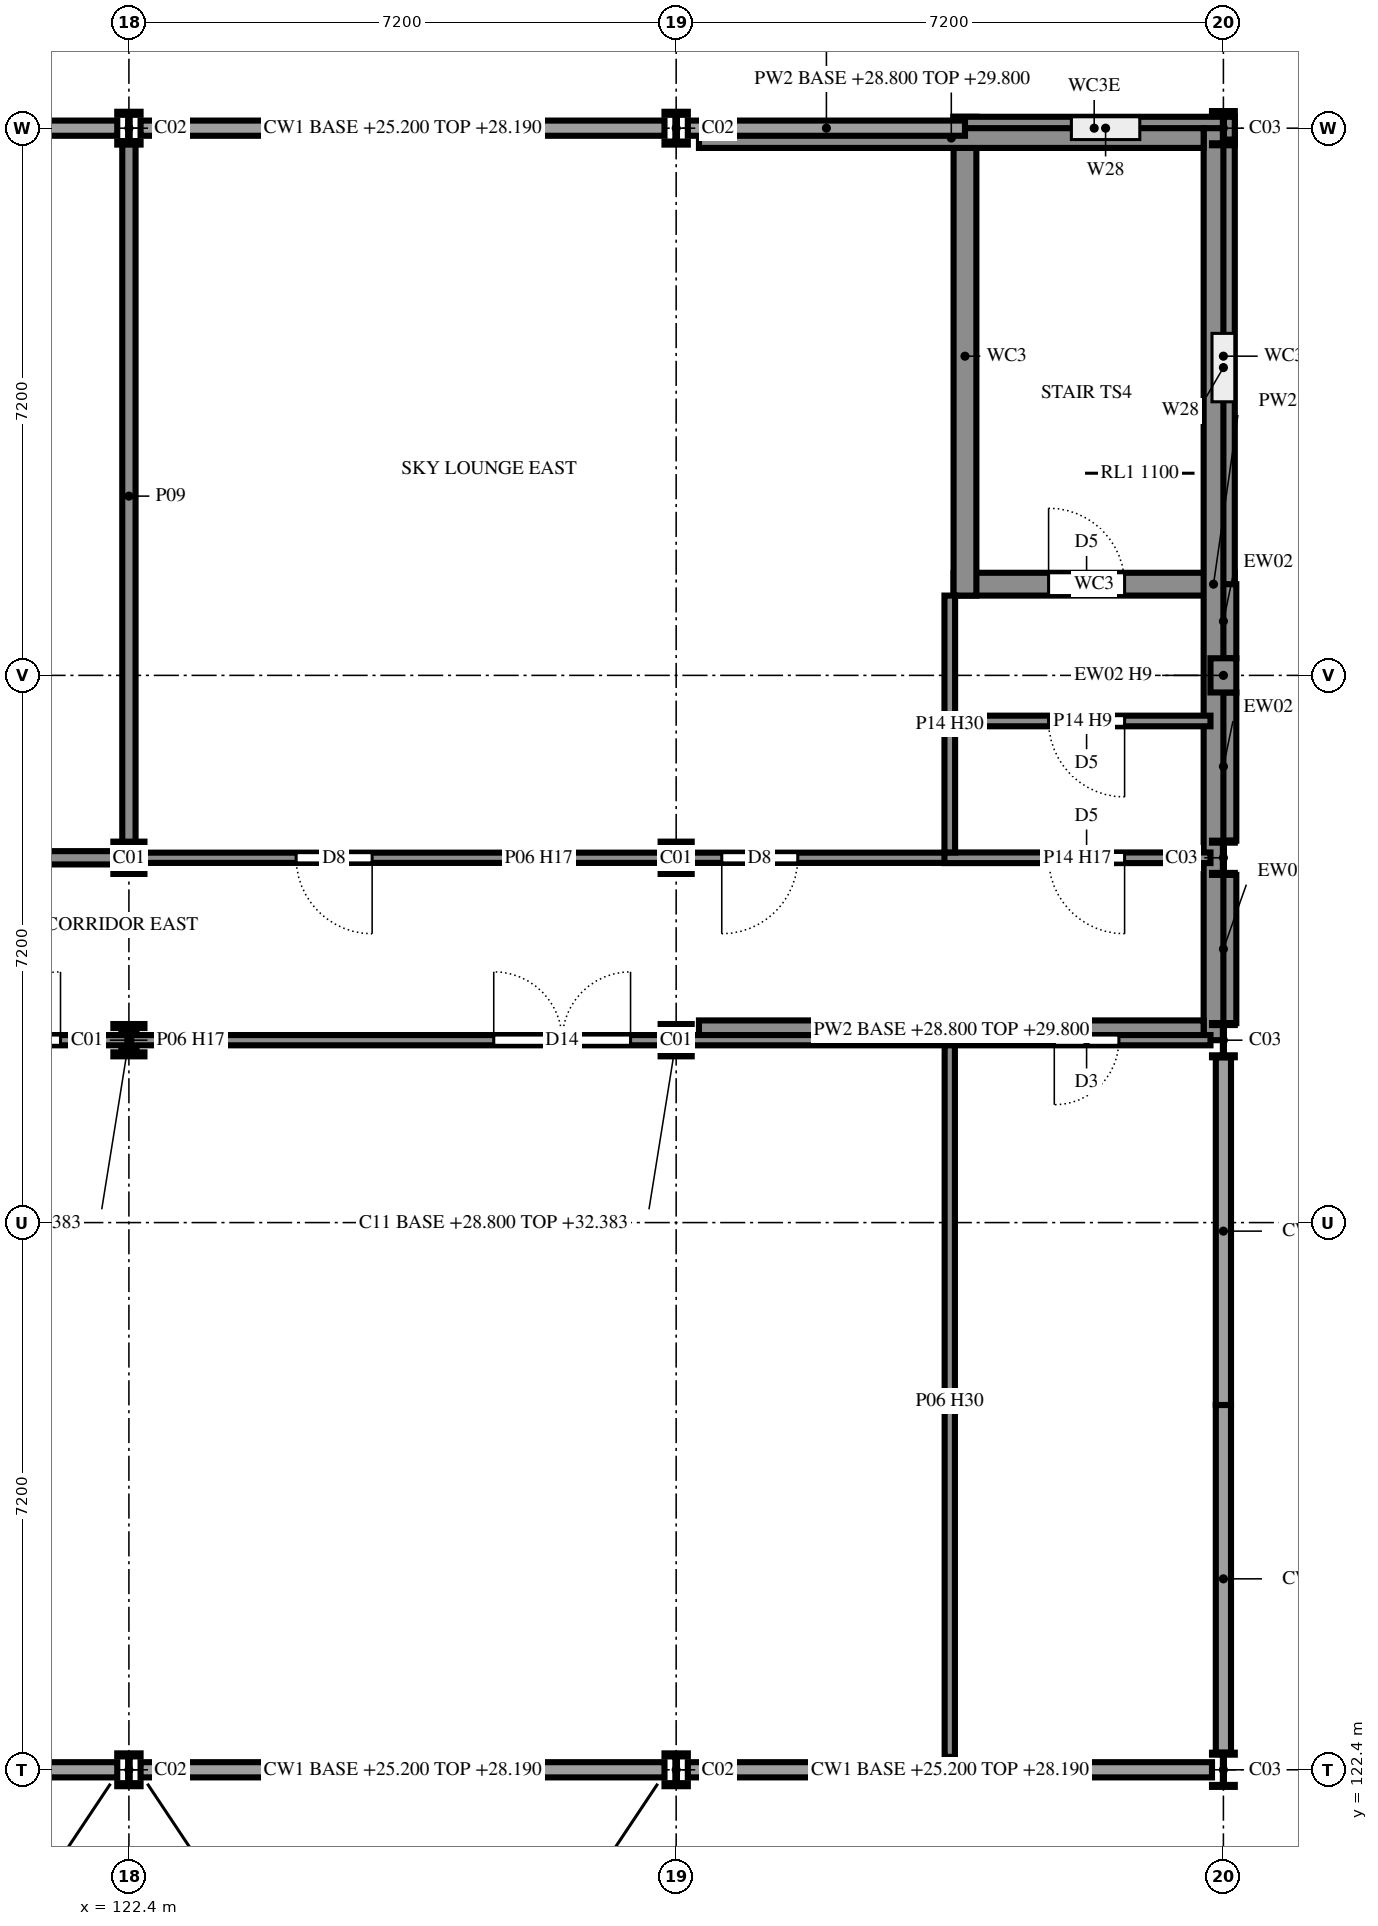
"""IFC4 building model, lengths in metres.
Left out: names, types, materials, properties, quantities, classifications, styles, units other than length and angle.
Written with IfcOpenShell. Run it as: python <this file> out.ifc"""

import sys

from ifc_helpers import new_model, si_unit, direction, frame, frame_2d, origin, origin_2d, place, context, subcontext, project, spatial, rectangle, i_section, extrude, element, fill, save


model = new_model("IFC4")
c1 = context("Model", 3, precision=1e-05, world=origin(), true_north=direction((0.0, 1.0)))
c2 = subcontext(c1, "Body", "Model", "MODEL_VIEW")
j1 = project(units=[si_unit("LENGTHUNIT", "METRE"), si_unit("PLANEANGLEUNIT", "RADIAN")], contexts=[c1])
p1 = place(None, origin())
s1 = spatial("IfcSite", under=j1, at=p1, CompositionType="ELEMENT")
p2 = place(p1, origin())
s2 = spatial("IfcBuilding", under=s1, at=p2, CompositionType="ELEMENT")
p3 = place(p2, frame((0.0, 0.0, 25.2)))
s3 = spatial("IfcBuildingStorey", under=s2, at=p3, CompositionType="ELEMENT", Elevation=25.2)
p4 = place(p3, frame((122.4, 122.4, 0.0), z_axis=(0.0, 0.0, 1.0), x_axis=(1.0, 0.0, 0.0)))
e1 = element("IfcColumn", 1, at=p4, inside=s3, PredefinedType="COLUMN", context=c2, shape_type="SweptSolid", body=[
    extrude(i_section(OverallWidth=0.307, OverallDepth=0.432, WebThickness=0.021, FlangeThickness=0.04, FilletRadius=0.027, at=origin_2d()), origin(), (0.0, 0.0, 1.0), 3.6),
])
for number, where, z_axis, x_axis in (
    (2, (122.4, 132.0, 0.0), (0.0, 0.0, 1.0), (1.0, 0.0, 0.0)),
    (3, (122.4, 134.4, 0.0), (0.0, 0.0, 1.0), (1.0, 0.0, 0.0)),
):
    element("IfcColumn", number, at=place(p3, frame(where, z_axis=z_axis, x_axis=x_axis)), inside=s3, PredefinedType="COLUMN", context=c2, shape_type="SweptSolid", body=[
        extrude(i_section(OverallWidth=0.409, OverallDepth=0.425, WebThickness=0.033, FlangeThickness=0.052, FilletRadius=0.015, at=origin_2d()), origin(), (0.0, 0.0, 1.0), 3.6),
    ])
for number, where, z_axis, x_axis in (
    (4, (122.4, 144.0, 0.0), (0.0, 0.0, 1.0), (1.0, 0.0, 0.0)),
    (5, (129.6, 122.4, 0.0), (0.0, 0.0, 1.0), (1.0, 0.0, 0.0)),
):
    element("IfcColumn", number, at=place(p3, frame(where, z_axis=z_axis, x_axis=x_axis)), inside=s3, PredefinedType="COLUMN", context=c2, shape_type="SweptSolid", body=[
        extrude(i_section(OverallWidth=0.307, OverallDepth=0.432, WebThickness=0.021, FlangeThickness=0.04, FilletRadius=0.027, at=origin_2d()), origin(), (0.0, 0.0, 1.0), 3.6),
    ])
for number, where, z_axis, x_axis in (
    (6, (129.6, 132.0, 0.0), (0.0, 0.0, 1.0), (1.0, 0.0, 0.0)),
    (7, (129.6, 134.4, 0.0), (0.0, 0.0, 1.0), (1.0, 0.0, 0.0)),
):
    element("IfcColumn", number, at=place(p3, frame(where, z_axis=z_axis, x_axis=x_axis)), inside=s3, PredefinedType="COLUMN", context=c2, shape_type="SweptSolid", body=[
        extrude(i_section(OverallWidth=0.409, OverallDepth=0.425, WebThickness=0.033, FlangeThickness=0.052, FilletRadius=0.015, at=origin_2d()), origin(), (0.0, 0.0, 1.0), 3.6),
    ])
p5 = place(p3, frame((129.6, 144.0, 0.0), z_axis=(0.0, 0.0, 1.0), x_axis=(1.0, 0.0, 0.0)))
e8 = element("IfcColumn", 8, at=p5, inside=s3, PredefinedType="COLUMN", context=c2, shape_type="SweptSolid", body=[
    extrude(i_section(OverallWidth=0.307, OverallDepth=0.432, WebThickness=0.021, FlangeThickness=0.04, FilletRadius=0.027, at=origin_2d()), origin(), (0.0, 0.0, 1.0), 3.6),
])
for number, where, z_axis, x_axis in (
    (9, (136.8, 122.4, 0.0), (0.0, 0.0, 1.0), (1.0, 0.0, 0.0)),
    (10, (136.8, 132.0, 0.0), (0.0, 0.0, 1.0), (1.0, 0.0, 0.0)),
    (11, (136.8, 134.4, 0.0), (0.0, 0.0, 1.0), (1.0, 0.0, 0.0)),
    (12, (136.8, 144.0, 0.0), (0.0, 0.0, 1.0), (1.0, 0.0, 0.0)),
):
    element("IfcColumn", number, at=place(p3, frame(where, z_axis=z_axis, x_axis=x_axis)), inside=s3, PredefinedType="COLUMN", context=c2, shape_type="SweptSolid", body=[
        extrude(i_section(OverallWidth=0.3, OverallDepth=0.45, WebThickness=0.014, FlangeThickness=0.026, FilletRadius=0.027, at=origin_2d()), origin(), (0.0, 0.0, 1.0), 3.6),
    ])
p6 = place(p3, frame((133.25, 138.0, 0.0), z_axis=(0.0, 0.0, 1.0), x_axis=(1.0, 0.0, 0.0)))
e13 = element("IfcWall", 13, at=p6, inside=s3, PredefinedType="SHEAR", context=c2, shape_type="SweptSolid", body=[
    extrude(rectangle(XDim=3.7, YDim=0.3, at=frame_2d((1.85, 0.0))), origin(), (0.0, 0.0, 1.0), 3.6),
])
p7 = place(p6, frame((1.25, 0.0, 0.0)))
e14 = element("IfcOpeningElement", 14, at=p7, cuts=e13, PredefinedType="OPENING", context=c2, shape_type="SweptSolid", body=[
    extrude(rectangle(XDim=1.0, YDim=2.1, at=frame_2d((0.5, 1.05))), frame((0.0, 0.16, 0.0), z_axis=(0.0, -1.0, 0.0), x_axis=(1.0, 0.0, 0.0)), (0.0, 0.0, 1.0), 0.32),
])
p8 = place(p3, frame((136.8, 137.85, 0.0), z_axis=(0.0, 0.0, 1.0), x_axis=(0.0, 1.0, 0.0)))
e15 = element("IfcWall", 15, at=p8, inside=s3, PredefinedType="SHEAR", context=c2, shape_type="SweptSolid", body=[
    extrude(rectangle(XDim=6.3, YDim=0.3, at=frame_2d((3.15, 0.0))), origin(), (0.0, 0.0, 1.0), 3.6),
])
p9 = place(p8, frame((2.55, 0.0, 0.6)))
e16 = element("IfcOpeningElement", 16, at=p9, cuts=e15, PredefinedType="OPENING", context=c2, shape_type="SweptSolid", body=[
    extrude(rectangle(XDim=0.9, YDim=2.1, at=frame_2d((0.45, 1.05))), frame((0.0, 0.16, 0.0), z_axis=(0.0, -1.0, 0.0), x_axis=(1.0, 0.0, 0.0)), (0.0, 0.0, 1.0), 0.32),
])
p10 = place(p3, frame((133.4, 144.15, 0.0), z_axis=(0.0, 0.0, 1.0), x_axis=(0.0, -1.0, 0.0)))
e17 = element("IfcWall", 17, at=p10, inside=s3, PredefinedType="SHEAR", context=c2, shape_type="SweptSolid", body=[
    extrude(rectangle(XDim=6.3, YDim=0.3, at=frame_2d((3.15, 0.0))), origin(), (0.0, 0.0, 1.0), 3.6),
])
p11 = place(p3, frame((136.95, 144.0, 0.0), z_axis=(0.0, 0.0, 1.0), x_axis=(-1.0, 0.0, 0.0)))
e18 = element("IfcWall", 18, at=p11, inside=s3, PredefinedType="SHEAR", context=c2, shape_type="SweptSolid", body=[
    extrude(rectangle(XDim=3.7, YDim=0.3, at=frame_2d((1.85, 0.0))), origin(), (0.0, 0.0, 1.0), 3.6),
])
p12 = place(p11, frame((1.25, 0.0, 0.6)))
e19 = element("IfcOpeningElement", 19, at=p12, cuts=e18, PredefinedType="OPENING", context=c2, shape_type="SweptSolid", body=[
    extrude(rectangle(XDim=0.9, YDim=2.1, at=frame_2d((0.45, 1.05))), frame((0.0, 0.16, 0.0), z_axis=(0.0, -1.0, 0.0), x_axis=(1.0, 0.0, 0.0)), (0.0, 0.0, 1.0), 0.32),
])
p13 = place(p3, frame((136.8, 132.225, 0.0), z_axis=(0.0, 0.0, 1.0), x_axis=(0.0, 1.0, 0.0)))
e20 = element("IfcWall", 20, at=p13, inside=s3, PredefinedType="SOLIDWALL", context=c2, shape_type="SweptSolid", body=[
    extrude(rectangle(XDim=1.95, YDim=0.34, at=frame_2d((0.975, 0.0))), origin(), (0.0, 0.0, 1.0), 3.09),
])
p14 = place(p3, frame((136.8, 134.625, 0.0), z_axis=(0.0, 0.0, 1.0), x_axis=(0.0, 1.0, 0.0)))
e21 = element("IfcWall", 21, at=p14, inside=s3, PredefinedType="SOLIDWALL", context=c2, shape_type="SweptSolid", body=[
    extrude(rectangle(XDim=1.95, YDim=0.34, at=frame_2d((0.975, 0.0))), origin(), (0.0, 0.0, 1.0), 3.29),
])
p15 = place(p3, frame((136.8, 137.025, 0.0), z_axis=(0.0, 0.0, 1.0), x_axis=(0.0, 1.0, 0.0)))
e22 = element("IfcWall", 22, at=p15, inside=s3, PredefinedType="SOLIDWALL", context=c2, shape_type="SweptSolid", body=[
    extrude(rectangle(XDim=0.975, YDim=0.34, at=frame_2d((0.488, 0.0))), origin(), (0.0, 0.0, 1.0), 3.29),
])
p16 = place(p3, frame((136.67, 132.0, 3.6), z_axis=(0.0, 0.0, 1.0), x_axis=(0.0, 1.0, 0.0)))
e23 = element("IfcWall", 23, at=p16, inside=s3, PredefinedType="PARAPET", context=c2, shape_type="SweptSolid", body=[
    extrude(rectangle(XDim=12.0, YDim=0.26, at=frame_2d((6.0, 0.0))), origin(), (0.0, 0.0, 1.0), 1.0),
])
for number, where, z_axis, x_axis in (
    (24, (129.9, 132.13, 3.6), (0.0, 0.0, 1.0), (1.0, 0.0, 0.0)),
    (25, (129.9, 143.87, 3.6), (0.0, 0.0, 1.0), (1.0, 0.0, 0.0)),
):
    element("IfcWall", number, at=place(p3, frame(where, z_axis=z_axis, x_axis=x_axis)), inside=s3, PredefinedType="PARAPET", context=c2, shape_type="SweptSolid", body=[
        extrude(rectangle(XDim=6.64, YDim=0.26, at=frame_2d((3.32, 0.0))), origin(), (0.0, 0.0, 1.0), 1.0),
    ])
for number, where, z_axis, x_axis in (
    (26, (122.4, 132.0, 3.6), (0.0, 0.0, 1.0), (1.0, 0.0, 0.0)),
    (27, (129.6, 132.0, 3.6), (0.0, 0.0, 1.0), (1.0, 0.0, 0.0)),
):
    element("IfcColumn", number, at=place(p3, frame(where, z_axis=z_axis, x_axis=x_axis)), inside=s3, PredefinedType="COLUMN", context=c2, shape_type="SweptSolid", body=[
        extrude(i_section(OverallWidth=0.2, OverallDepth=0.2, WebThickness=0.009, FlangeThickness=0.015, FilletRadius=0.018, at=origin_2d()), origin(), (0.0, 0.0, 1.0), 3.583),
    ])
p17 = place(p3, frame((136.8, 136.575, 0.0), z_axis=(0.0, 0.0, 1.0), x_axis=(0.0, 1.0, 0.0)))
e28 = element("IfcWall", 28, at=p17, inside=s3, PredefinedType="SOLIDWALL", context=c2, shape_type="SweptSolid", body=[
    extrude(rectangle(XDim=0.45, YDim=0.34, at=frame_2d((0.225, 0.0))), origin(), (0.0, 0.0, 1.0), 3.29),
])
p18 = place(p3, frame((108.2, 132.0, 0.0), z_axis=(0.0, 0.0, 1.0), x_axis=(1.0, 0.0, 0.0)))
e29 = element("IfcWall", 29, at=p18, inside=s3, PredefinedType="PARTITIONING", context=c2, shape_type="SweptSolid", body=[
    extrude(rectangle(XDim=28.43, YDim=0.135, at=frame_2d((14.215, 0.0))), origin(), (0.0, 0.0, 1.0), 2.99),
])
p19 = place(p18, frame((26.375, 0.0, 0.0)))
e30 = element("IfcOpeningElement", 30, at=p19, cuts=e29, PredefinedType="OPENING", context=c2, shape_type="SweptSolid", body=[
    extrude(rectangle(XDim=0.85, YDim=2.1, at=frame_2d((0.425, 1.05))), frame((0.0, 0.077, 0.0), z_axis=(0.0, -1.0, 0.0), x_axis=(1.0, 0.0, 0.0)), (0.0, 0.0, 1.0), 0.155),
])
p20 = place(p18, frame((3.1, 0.0, 0.0)))
e31 = element("IfcOpeningElement", 31, at=p20, cuts=e29, PredefinedType="OPENING", context=c2, shape_type="SweptSolid", body=[
    extrude(rectangle(XDim=1.8, YDim=2.1, at=frame_2d((0.9, 1.05))), frame((0.0, 0.077, 0.0), z_axis=(0.0, -1.0, 0.0), x_axis=(1.0, 0.0, 0.0)), (0.0, 0.0, 1.0), 0.155),
])
p21 = place(p18, frame((11.5, 0.0, 0.0)))
e32 = element("IfcOpeningElement", 32, at=p21, cuts=e29, PredefinedType="OPENING", context=c2, shape_type="SweptSolid", body=[
    extrude(rectangle(XDim=1.8, YDim=2.1, at=frame_2d((0.9, 1.05))), frame((0.0, 0.077, 0.0), z_axis=(0.0, -1.0, 0.0), x_axis=(1.0, 0.0, 0.0)), (0.0, 0.0, 1.0), 0.155),
])
p22 = place(p18, frame((19.0, 0.0, 0.0)))
e33 = element("IfcOpeningElement", 33, at=p22, cuts=e29, PredefinedType="OPENING", context=c2, shape_type="SweptSolid", body=[
    extrude(rectangle(XDim=1.8, YDim=2.1, at=frame_2d((0.9, 1.05))), frame((0.0, 0.077, 0.0), z_axis=(0.0, -1.0, 0.0), x_axis=(1.0, 0.0, 0.0)), (0.0, 0.0, 1.0), 0.155),
])
p23 = place(p3, frame((108.2, 134.4, 0.0), z_axis=(0.0, 0.0, 1.0), x_axis=(1.0, 0.0, 0.0)))
e34 = element("IfcWall", 34, at=p23, inside=s3, PredefinedType="PARTITIONING", context=c2, shape_type="SweptSolid", body=[
    extrude(rectangle(XDim=14.288, YDim=0.175, at=frame_2d((7.144, 0.0))), origin(), (0.0, 0.0, 1.0), 2.99),
])
p24 = place(p23, frame((7.6, 0.0, 0.0)))
e35 = element("IfcOpeningElement", 35, at=p24, cuts=e34, PredefinedType="OPENING", context=c2, shape_type="SweptSolid", body=[
    extrude(rectangle(XDim=1.0, YDim=2.4, at=frame_2d((0.5, 1.2))), frame((0.0, 0.097, 0.0), z_axis=(0.0, -1.0, 0.0), x_axis=(1.0, 0.0, 0.0)), (0.0, 0.0, 1.0), 0.195),
])
p25 = place(p3, frame((122.312, 134.4, 0.0), z_axis=(0.0, 0.0, 1.0), x_axis=(1.0, 0.0, 0.0)))
e36 = element("IfcWall", 36, at=p25, inside=s3, PredefinedType="PARTITIONING", context=c2, shape_type="SweptSolid", body=[
    extrude(rectangle(XDim=10.958, YDim=0.135, at=frame_2d((5.479, 0.0))), origin(), (0.0, 0.0, 1.0), 2.99),
])
p26 = place(p25, frame((2.288, 0.0, 0.0)))
e37 = element("IfcOpeningElement", 37, at=p26, cuts=e36, PredefinedType="OPENING", context=c2, shape_type="SweptSolid", body=[
    extrude(rectangle(XDim=1.0, YDim=2.4, at=frame_2d((0.5, 1.2))), frame((0.0, 0.077, 0.0), z_axis=(0.0, -1.0, 0.0), x_axis=(1.0, 0.0, 0.0)), (0.0, 0.0, 1.0), 0.155),
])
p27 = place(p25, frame((7.887, 0.0, 0.0)))
e38 = element("IfcOpeningElement", 38, at=p27, cuts=e36, PredefinedType="OPENING", context=c2, shape_type="SweptSolid", body=[
    extrude(rectangle(XDim=1.0, YDim=2.4, at=frame_2d((0.5, 1.2))), frame((0.0, 0.077, 0.0), z_axis=(0.0, -1.0, 0.0), x_axis=(1.0, 0.0, 0.0)), (0.0, 0.0, 1.0), 0.155),
])
p28 = place(p3, frame((133.13, 134.4, 0.0), z_axis=(0.0, 0.0, 1.0), x_axis=(1.0, 0.0, 0.0)))
e39 = element("IfcWall", 39, at=p28, inside=s3, PredefinedType="PARTITIONING", context=c2, shape_type="SweptSolid", body=[
    extrude(rectangle(XDim=3.5, YDim=0.14, at=frame_2d((1.75, 0.0))), origin(), (0.0, 0.0, 1.0), 2.99),
])
p29 = place(p28, frame((1.37, 0.0, 0.0)))
e40 = element("IfcOpeningElement", 40, at=p29, cuts=e39, PredefinedType="OPENING", context=c2, shape_type="SweptSolid", body=[
    extrude(rectangle(XDim=1.0, YDim=2.1, at=frame_2d((0.5, 1.05))), frame((0.0, 0.08, 0.0), z_axis=(0.0, -1.0, 0.0), x_axis=(1.0, 0.0, 0.0)), (0.0, 0.0, 1.0), 0.16),
])
p30 = place(p3, frame((133.27, 136.2, 0.0), z_axis=(0.0, 0.0, 1.0), x_axis=(1.0, 0.0, 0.0)))
e41 = element("IfcWall", 41, at=p30, inside=s3, PredefinedType="PARTITIONING", context=c2, shape_type="SweptSolid", body=[
    extrude(rectangle(XDim=3.36, YDim=0.14, at=frame_2d((1.68, 0.0))), origin(), (0.0, 0.0, 1.0), 3.29),
])
p31 = place(p30, frame((1.23, 0.0, 0.0)))
e42 = element("IfcOpeningElement", 42, at=p31, cuts=e41, PredefinedType="OPENING", context=c2, shape_type="SweptSolid", body=[
    extrude(rectangle(XDim=1.0, YDim=2.1, at=frame_2d((0.5, 1.05))), frame((0.0, 0.08, 0.0), z_axis=(0.0, -1.0, 0.0), x_axis=(1.0, 0.0, 0.0)), (0.0, 0.0, 1.0), 0.16),
])
p32 = place(p3, frame((122.4, 134.488, 0.0), z_axis=(0.0, 0.0, 1.0), x_axis=(0.0, 1.0, 0.0)))
e43 = element("IfcWall", 43, at=p32, inside=s3, PredefinedType="PARTITIONING", context=c2, shape_type="SweptSolid", body=[
    extrude(rectangle(XDim=9.343, YDim=0.175, at=frame_2d((4.671, 0.0))), origin(), (0.0, 0.0, 1.0), 2.89),
])
p33 = place(p3, frame((133.2, 122.57, 0.0), z_axis=(0.0, 0.0, 1.0), x_axis=(0.0, 1.0, 0.0)))
e44 = element("IfcWall", 44, at=p33, inside=s3, PredefinedType="PARTITIONING", context=c2, shape_type="SweptSolid", body=[
    extrude(rectangle(XDim=9.363, YDim=0.135, at=frame_2d((4.681, 0.0))), origin(), (0.0, 0.0, 1.0), 2.89),
])
p34 = place(p3, frame((133.2, 134.47, 0.0), z_axis=(0.0, 0.0, 1.0), x_axis=(0.0, 1.0, 0.0)))
e45 = element("IfcWall", 45, at=p34, inside=s3, PredefinedType="PARTITIONING", context=c2, shape_type="SweptSolid", body=[
    extrude(rectangle(XDim=3.38, YDim=0.14, at=frame_2d((1.69, 0.0))), origin(), (0.0, 0.0, 1.0), 2.89),
])
p35 = place(p9, origin())
e46 = element("IfcWindow", 46, at=p35, inside=s3, PartitioningType="SINGLE_PANEL", PredefinedType="WINDOW", context=c2, shape_type="SweptSolid", body=[
    extrude(rectangle(XDim=0.9, YDim=2.1, at=frame_2d((0.45, 1.05))), frame((0.0, 0.03, 0.0), z_axis=(0.0, -1.0, 0.0), x_axis=(1.0, 0.0, 0.0)), (0.0, 0.0, 1.0), 0.06),
])
fill(e16, e46)
p36 = place(p12, origin())
e47 = element("IfcWindow", 47, at=p36, inside=s3, PartitioningType="SINGLE_PANEL", PredefinedType="WINDOW", context=c2, shape_type="SweptSolid", body=[
    extrude(rectangle(XDim=0.9, YDim=2.1, at=frame_2d((0.45, 1.05))), frame((0.0, 0.03, 0.0), z_axis=(0.0, -1.0, 0.0), x_axis=(1.0, 0.0, 0.0)), (0.0, 0.0, 1.0), 0.06),
])
fill(e19, e47)
p37 = place(p19, frame((0.85, 0.0, 0.0), z_axis=(0.0, 0.0, 1.0), x_axis=(-1.0, 0.0, 0.0)))
e48 = element("IfcDoor", 48, at=p37, inside=s3, OperationType="SINGLE_SWING_LEFT", PredefinedType="DOOR", context=c2, shape_type="SweptSolid", body=[
    extrude(rectangle(XDim=0.85, YDim=2.1, at=frame_2d((0.425, 1.05))), frame((0.0, 0.025, 0.0), z_axis=(0.0, -1.0, 0.0), x_axis=(1.0, 0.0, 0.0)), (0.0, 0.0, 1.0), 0.05),
])
fill(e30, e48)
p38 = place(p21, origin())
e49 = element("IfcDoor", 49, at=p38, inside=s3, OperationType="DOUBLE_DOOR_SINGLE_SWING", PredefinedType="DOOR", context=c2, shape_type="SweptSolid", body=[
    extrude(rectangle(XDim=1.8, YDim=2.1, at=frame_2d((0.9, 1.05))), frame((0.0, 0.025, 0.0), z_axis=(0.0, -1.0, 0.0), x_axis=(1.0, 0.0, 0.0)), (0.0, 0.0, 1.0), 0.05),
])
fill(e32, e49)
p39 = place(p22, origin())
e50 = element("IfcDoor", 50, at=p39, inside=s3, OperationType="DOUBLE_DOOR_SINGLE_SWING", PredefinedType="DOOR", context=c2, shape_type="SweptSolid", body=[
    extrude(rectangle(XDim=1.8, YDim=2.1, at=frame_2d((0.9, 1.05))), frame((0.0, 0.025, 0.0), z_axis=(0.0, -1.0, 0.0), x_axis=(1.0, 0.0, 0.0)), (0.0, 0.0, 1.0), 0.05),
])
fill(e33, e50)
p40 = place(p26, frame((1.0, 0.0, 0.0), z_axis=(0.0, 0.0, 1.0), x_axis=(-1.0, 0.0, 0.0)))
e51 = element("IfcDoor", 51, at=p40, inside=s3, OperationType="SINGLE_SWING_RIGHT", PredefinedType="DOOR", context=c2, shape_type="SweptSolid", body=[
    extrude(rectangle(XDim=1.0, YDim=2.4, at=frame_2d((0.5, 1.2))), frame((0.0, 0.025, 0.0), z_axis=(0.0, -1.0, 0.0), x_axis=(1.0, 0.0, 0.0)), (0.0, 0.0, 1.0), 0.05),
])
fill(e37, e51)
p41 = place(p27, frame((1.0, 0.0, 0.0), z_axis=(0.0, 0.0, 1.0), x_axis=(-1.0, 0.0, 0.0)))
e52 = element("IfcDoor", 52, at=p41, inside=s3, OperationType="SINGLE_SWING_LEFT", PredefinedType="DOOR", context=c2, shape_type="SweptSolid", body=[
    extrude(rectangle(XDim=1.0, YDim=2.4, at=frame_2d((0.5, 1.2))), frame((0.0, 0.025, 0.0), z_axis=(0.0, -1.0, 0.0), x_axis=(1.0, 0.0, 0.0)), (0.0, 0.0, 1.0), 0.05),
])
fill(e38, e52)
p42 = place(p29, frame((1.0, 0.0, 0.0), z_axis=(0.0, 0.0, 1.0), x_axis=(-1.0, 0.0, 0.0)))
e53 = element("IfcDoor", 53, at=p42, inside=s3, OperationType="SINGLE_SWING_RIGHT", PredefinedType="DOOR", context=c2, shape_type="SweptSolid", body=[
    extrude(rectangle(XDim=1.0, YDim=2.1, at=frame_2d((0.5, 1.05))), frame((0.0, 0.025, 0.0), z_axis=(0.0, -1.0, 0.0), x_axis=(1.0, 0.0, 0.0)), (0.0, 0.0, 1.0), 0.05),
])
fill(e40, e53)
p43 = place(p31, frame((1.0, 0.0, 0.0), z_axis=(0.0, 0.0, 1.0), x_axis=(-1.0, 0.0, 0.0)))
e54 = element("IfcDoor", 54, at=p43, inside=s3, OperationType="SINGLE_SWING_RIGHT", PredefinedType="DOOR", context=c2, shape_type="SweptSolid", body=[
    extrude(rectangle(XDim=1.0, YDim=2.1, at=frame_2d((0.5, 1.05))), frame((0.0, 0.025, 0.0), z_axis=(0.0, -1.0, 0.0), x_axis=(1.0, 0.0, 0.0)), (0.0, 0.0, 1.0), 0.05),
])
fill(e42, e54)
p44 = place(p7, origin())
e55 = element("IfcDoor", 55, at=p44, inside=s3, OperationType="SINGLE_SWING_RIGHT", PredefinedType="DOOR", context=c2, shape_type="SweptSolid", body=[
    extrude(rectangle(XDim=1.0, YDim=2.1, at=frame_2d((0.5, 1.05))), frame((0.0, 0.025, 0.0), z_axis=(0.0, -1.0, 0.0), x_axis=(1.0, 0.0, 0.0)), (0.0, 0.0, 1.0), 0.05),
])
fill(e14, e55)
save(model, sys.argv[1])
